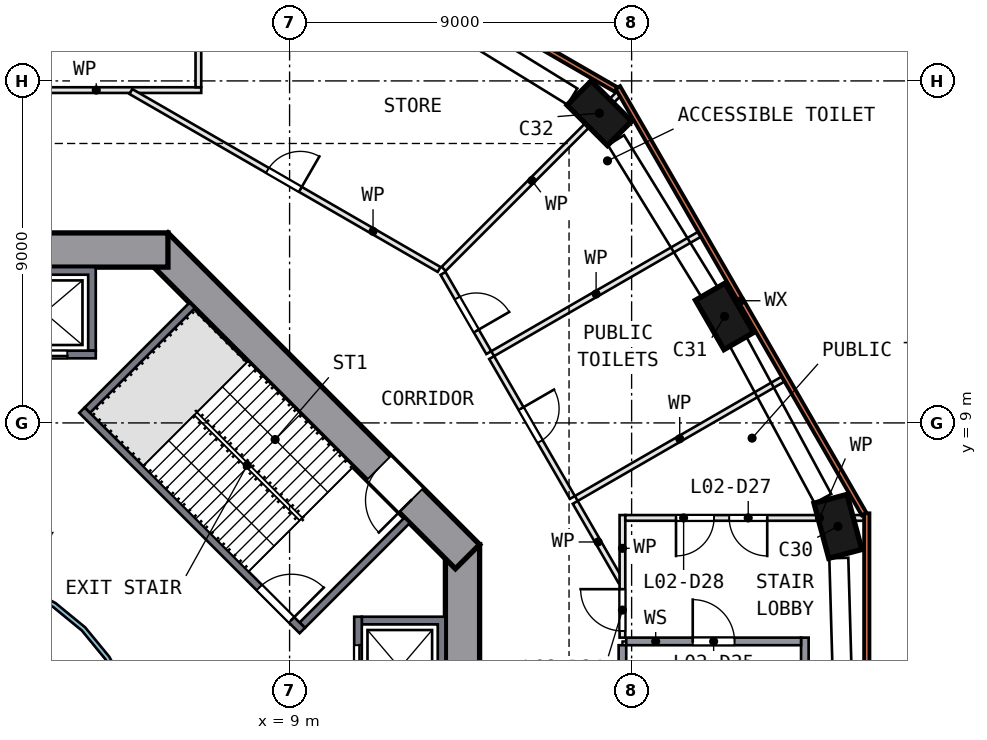
"""IFC4 building model, lengths in metres.
Left out: names, types, materials, properties, quantities, classifications, styles, units other than length and angle.
Written with IfcOpenShell. Run it as: python <this file> out.ifc"""

import sys

from ifc_helpers import new_model, si_unit, direction, frame, frame_2d, origin, origin_2d, place, context, subcontext, project, spatial, polyline, rectangle, outline, extrude, element, fill, save


model = new_model("IFC4")
c1 = context("Model", 3, precision=1e-05, world=origin(), true_north=direction((0.0, 1.0)))
c2 = subcontext(c1, "Body", "Model", "MODEL_VIEW")
j1 = project(units=[si_unit("LENGTHUNIT", "METRE"), si_unit("PLANEANGLEUNIT", "RADIAN")], contexts=[c1])
p1 = place(None, origin())
s1 = spatial("IfcSite", under=j1, at=p1, CompositionType="ELEMENT")
p2 = place(p1, origin())
s2 = spatial("IfcBuilding", under=s1, at=p2, CompositionType="ELEMENT")
p3 = place(p2, frame((0.0, 0.0, 14.0)))
s3 = spatial("IfcBuildingStorey", under=s2, at=p3, CompositionType="ELEMENT", Elevation=14.0)
for number, where, z_axis, x_axis in (
    (1, (23.428, 6.278, 0.0), (0.0, 0.0, 1.0), (0.259, -0.966, 0.0)),
    (2, (20.445, 11.804, 0.0), (0.0, 0.0, 1.0), (-0.5, 0.866, 0.0)),
    (3, (17.151, 17.151, 0.0), (0.0, 0.0, 1.0), (0.707, -0.707, 0.0)),
):
    element("IfcColumn", number, at=place(p3, frame(where, z_axis=z_axis, x_axis=x_axis)), inside=s3, PredefinedType="COLUMN", context=c2, shape_type="SweptSolid", body=[
        extrude(rectangle(XDim=1.5, YDim=0.9, at=origin_2d()), origin(), (0.0, 0.0, 1.0), 4.55),
    ])
p4 = place(p3, frame((13.55, -5.799, 0.0), z_axis=(0.0, 0.0, 1.0), x_axis=(0.0, 1.0, 0.0)))
e4 = element("IfcWall", 4, at=p4, inside=s3, PredefinedType="SHEAR", context=c2, shape_type="SweptSolid", body=[
    extrude(rectangle(XDim=11.598, YDim=0.9, at=frame_2d((5.799, 0.0))), origin(), (0.0, 0.0, 1.0), 5.0),
])
p5 = place(p4, frame((4.899, 0.0, 0.0)))
e5 = element("IfcOpeningElement", 5, at=p5, cuts=e4, PredefinedType="OPENING", context=c2, shape_type="SweptSolid", body=[
    extrude(rectangle(XDim=1.8, YDim=2.1, at=frame_2d((0.9, 1.05))), frame((0.0, 0.46, 0.0), z_axis=(0.0, -1.0, 0.0), x_axis=(1.0, 0.0, 0.0)), (0.0, 0.0, 1.0), 0.92),
])
p6 = place(p3, frame((13.682, 5.481, 0.0), z_axis=(0.0, 0.0, 1.0), x_axis=(-0.707106781, 0.707106781, 0.0)))
e6 = element("IfcWall", 6, at=p6, inside=s3, PredefinedType="SHEAR", context=c2, shape_type="SweptSolid", body=[
    extrude(rectangle(XDim=11.598, YDim=0.9, at=frame_2d((5.799, 0.0))), origin(), (0.0, 0.0, 1.0), 5.0),
])
p7 = place(p6, frame((2.099, 0.0, 0.0)))
e7 = element("IfcOpeningElement", 7, at=p7, cuts=e6, PredefinedType="OPENING", context=c2, shape_type="SweptSolid", body=[
    extrude(rectangle(XDim=1.2, YDim=2.1, at=frame_2d((0.6, 1.05))), frame((0.0, 0.46, 0.0), z_axis=(0.0, -1.0, 0.0), x_axis=(1.0, 0.0, 0.0)), (0.0, 0.0, 1.0), 0.92),
])
p8 = place(p3, frame((5.799, 13.55, 0.0), z_axis=(0.0, 0.0, 1.0), x_axis=(-1.0, 0.0, 0.0)))
e8 = element("IfcWall", 8, at=p8, inside=s3, PredefinedType="SHEAR", context=c2, shape_type="SweptSolid", body=[
    extrude(rectangle(XDim=11.598, YDim=0.9, at=frame_2d((5.799, 0.0))), origin(), (0.0, 0.0, 1.0), 5.0),
])
p9 = place(p8, frame((4.899, 0.0, 0.0)))
e9 = element("IfcOpeningElement", 9, at=p9, cuts=e8, PredefinedType="OPENING", context=c2, shape_type="SweptSolid", body=[
    extrude(rectangle(XDim=1.8, YDim=2.1, at=frame_2d((0.9, 1.05))), frame((0.0, 0.46, 0.0), z_axis=(0.0, -1.0, 0.0), x_axis=(1.0, 0.0, 0.0)), (0.0, 0.0, 1.0), 0.92),
])
p10 = place(p3, frame((24.188, -6.621, 0.0), z_axis=(0.0, 0.0, 1.0), x_axis=(0.0, 1.0, 0.0)))
e10 = element("IfcWall", 10, at=p10, inside=s3, PredefinedType="SOLIDWALL", context=c2, shape_type="SweptSolid", body=[
    extrude(rectangle(XDim=13.242, YDim=0.14, at=frame_2d((6.621, 0.0))), origin(), (0.0, 0.0, 1.0), 4.55),
])
p11 = place(p3, frame((24.118, 6.603, 0.0), z_axis=(0.0, 0.0, 1.0), x_axis=(-0.499997984, 0.866026568, 0.0)))
e11 = element("IfcWall", 11, at=p11, inside=s3, PredefinedType="SOLIDWALL", context=c2, shape_type="SweptSolid", body=[
    extrude(rectangle(XDim=12.962, YDim=0.14, at=frame_2d((6.481, 0.0))), origin(), (0.0, 0.0, 1.0), 4.55),
])
p12 = place(p3, frame((17.586, 17.777, 0.0), z_axis=(0.0, 0.0, 1.0), x_axis=(-0.866023287, 0.500003667, 0.0)))
e12 = element("IfcWall", 12, at=p12, inside=s3, PredefinedType="SOLIDWALL", context=c2, shape_type="SweptSolid", body=[
    extrude(rectangle(XDim=12.801, YDim=0.14, at=frame_2d((6.4, 0.0))), origin(), (0.0, 0.0, 1.0), 4.55),
])
p13 = place(p3, origin())
e13 = element("IfcWall", 13, at=p13, inside=s3, PredefinedType="SOLIDWALL", context=c2, shape_type="SweptSolid", body=[
    extrude(outline(polyline([(13.1, 3.9), (13.1, 1.2), (10.9, 1.2), (10.9, 1.4), (12.9, 1.4), (12.9, 3.7), (10.9, 3.7), (10.9, 3.9), (13.1, 3.9)])), origin(), (0.0, 0.0, 1.0), 4.55),
])
p14 = place(p3, frame((10.8, 1.2, 0.0), z_axis=(0.0, 0.0, 1.0), x_axis=(0.0, 1.0, 0.0)))
e14 = element("IfcWall", 14, at=p14, inside=s3, PredefinedType="SOLIDWALL", context=c2, shape_type="SweptSolid", body=[
    extrude(rectangle(XDim=2.7, YDim=0.2, at=frame_2d((1.35, 0.0))), origin(), (0.0, 0.0, 1.0), 4.55),
])
p15 = place(p14, frame((0.75, 0.0, 0.0)))
e15 = element("IfcOpeningElement", 15, at=p15, cuts=e14, PredefinedType="OPENING", context=c2, shape_type="SweptSolid", body=[
    extrude(rectangle(XDim=1.2, YDim=2.1, at=frame_2d((0.6, 1.05))), frame((0.0, 0.11, 0.0), z_axis=(0.0, -1.0, 0.0), x_axis=(1.0, 0.0, 0.0)), (0.0, 0.0, 1.0), 0.22),
])
p16 = place(p3, origin())
e16 = element("IfcWall", 16, at=p16, inside=s3, PredefinedType="SOLIDWALL", context=c2, shape_type="SweptSolid", body=[
    extrude(outline(polyline([(3.9, 13.1), (3.9, 10.9), (3.7, 10.9), (3.7, 12.9), (1.4, 12.9), (1.4, 10.9), (1.2, 10.9), (1.2, 13.1), (3.9, 13.1)])), origin(), (0.0, 0.0, 1.0), 4.55),
])
p17 = place(p3, frame((1.2, 10.8, 0.0), z_axis=(0.0, 0.0, 1.0), x_axis=(1.0, 0.0, 0.0)))
e17 = element("IfcWall", 17, at=p17, inside=s3, PredefinedType="SOLIDWALL", context=c2, shape_type="SweptSolid", body=[
    extrude(rectangle(XDim=2.7, YDim=0.2, at=frame_2d((1.35, 0.0))), origin(), (0.0, 0.0, 1.0), 4.55),
])
p18 = place(p17, frame((0.75, 0.0, 0.0)))
e18 = element("IfcOpeningElement", 18, at=p18, cuts=e17, PredefinedType="OPENING", context=c2, shape_type="SweptSolid", body=[
    extrude(rectangle(XDim=1.2, YDim=2.1, at=frame_2d((0.6, 1.05))), frame((0.0, 0.11, 0.0), z_axis=(0.0, -1.0, 0.0), x_axis=(1.0, 0.0, 0.0)), (0.0, 0.0, 1.0), 0.22),
])
p19 = place(p3, frame((3.535, 9.334, 0.0), z_axis=(0.0, 0.0, 1.0), x_axis=(0.707106781, -0.707106781, 0.0)))
e19 = element("IfcWall", 19, at=p19, inside=s3, PredefinedType="SOLIDWALL", context=c2, shape_type="SweptSolid", body=[
    extrude(rectangle(XDim=8.2, YDim=0.2, at=frame_2d((4.1, 0.0))), origin(), (0.0, 0.0, 1.0), 4.55),
])
p20 = place(p19, frame((6.6, 0.0, 0.0)))
e20 = element("IfcOpeningElement", 20, at=p20, cuts=e19, PredefinedType="OPENING", context=c2, shape_type="SweptSolid", body=[
    extrude(rectangle(XDim=1.2, YDim=2.1, at=frame_2d((0.6, 1.05))), frame((0.0, 0.11, 0.0), z_axis=(0.0, -1.0, 0.0), x_axis=(1.0, 0.0, 0.0)), (0.0, 0.0, 1.0), 0.22),
])
for number, where, z_axis, x_axis in (
    (21, (9.334, 3.677, 0.0), (0.0, 0.0, 1.0), (0.707, 0.707, 0.0)),
    (22, (3.677, 9.334, 0.0), (0.0, 0.0, 1.0), (0.707, 0.707, 0.0)),
):
    element("IfcWall", number, at=place(p3, frame(where, z_axis=z_axis, x_axis=x_axis)), inside=s3, PredefinedType="SOLIDWALL", context=c2, shape_type="SweptSolid", body=[
        extrude(rectangle(XDim=3.9, YDim=0.2, at=frame_2d((1.95, 0.0))), origin(), (0.0, 0.0, 1.0), 4.55),
    ])
p21 = place(p3, origin())
e23 = element("IfcWall", 23, at=p21, inside=s3, PredefinedType="SOLIDWALL", context=c2, shape_type="SweptSolid", body=[
    extrude(outline(polyline([(5.021, -0.999), (4.73, -1.959), (4.257, -2.844), (3.62, -3.62), (2.844, -4.257), (1.959, -4.73), (0.999, -5.021), (0.0, -5.12), (-0.999, -5.021), (-1.959, -4.73), (-2.844, -4.257), (-3.62, -3.62), (-4.257, -2.844), (-4.73, -1.959), (-5.021, -0.999), (-5.12, 0.0), (-5.021, 0.999), (-4.73, 1.959), (-4.257, 2.844), (-3.62, 3.62), (-2.844, 4.257), (-1.959, 4.73), (-0.999, 5.021), (0.0, 5.12), (0.999, 5.021), (1.959, 4.73), (2.844, 4.257), (3.62, 3.62), (4.257, 2.844), (4.73, 1.959), (5.021, 0.999), (5.12, 0.0), (5.021, -0.999)]), holes=[polyline([(4.904, 0.976), (4.619, 1.913), (4.157, 2.778), (3.535, 3.535), (2.778, 4.157), (1.913, 4.619), (0.976, 4.904), (0.0, 5.0), (-0.976, 4.904), (-1.913, 4.619), (-2.778, 4.157), (-3.535, 3.535), (-4.157, 2.778), (-4.619, 1.913), (-4.904, 0.976), (-5.0, 0.0), (-4.904, -0.976), (-4.619, -1.913), (-4.157, -2.778), (-3.535, -3.535), (-2.778, -4.157), (-1.913, -4.619), (-0.976, -4.904), (0.0, -5.0), (0.976, -4.904), (1.913, -4.619), (2.778, -4.157), (3.535, -3.535), (4.157, -2.778), (4.619, -1.913), (4.904, -0.976), (5.0, 0.0), (4.904, 0.976)])]), origin(), (0.0, 0.0, 1.0), 4.55),
])
p22 = place(p3, frame((1.15, 17.758, 0.0), z_axis=(0.0, 0.0, 1.0), x_axis=(1.0, 0.0, 0.0)))
e24 = element("IfcWall", 24, at=p22, inside=s3, PredefinedType="PARTITIONING", context=c2, shape_type="SweptSolid", body=[
    extrude(rectangle(XDim=5.525, YDim=0.15, at=frame_2d((2.763, 0.0))), origin(), (0.0, 0.0, 1.0), 4.55),
])
p23 = place(p3, frame((4.823, 17.721, 0.0), z_axis=(0.0, 0.0, 1.0), x_axis=(0.866037142, -0.499979668, 0.0)))
e25 = element("IfcWall", 25, at=p23, inside=s3, PredefinedType="PARTITIONING", context=c2, shape_type="SweptSolid", body=[
    extrude(rectangle(XDim=9.367, YDim=0.15, at=frame_2d((4.683, 0.0))), origin(), (0.0, 0.0, 1.0), 4.55),
])
p24 = place(p23, frame((4.15, 0.0, 0.0)))
e26 = element("IfcOpeningElement", 26, at=p24, cuts=e25, PredefinedType="OPENING", context=c2, shape_type="SweptSolid", body=[
    extrude(rectangle(XDim=1.0, YDim=2.1, at=frame_2d((0.5, 1.05))), frame((0.0, 0.085, 0.0), z_axis=(0.0, -1.0, 0.0), x_axis=(1.0, 0.0, 0.0)), (0.0, 0.0, 1.0), 0.17),
])
p25 = place(p3, frame((6.6, 17.833, 0.0), z_axis=(0.0, 0.0, 1.0), x_axis=(0.0, 1.0, 0.0)))
e27 = element("IfcWall", 27, at=p25, inside=s3, PredefinedType="PARTITIONING", context=c2, shape_type="SweptSolid", body=[
    extrude(rectangle(XDim=5.582, YDim=0.15, at=frame_2d((2.791, 0.0))), origin(), (0.0, 0.0, 1.0), 4.55),
])
p26 = place(p3, frame((13.038, 12.935, 0.0), z_axis=(0.0, 0.0, 1.0), x_axis=(0.499933044, -0.866064057, 0.0)))
e28 = element("IfcWall", 28, at=p26, inside=s3, PredefinedType="PARTITIONING", context=c2, shape_type="SweptSolid", body=[
    extrude(rectangle(XDim=2.408, YDim=0.15, at=frame_2d((1.204, 0.0))), origin(), (0.0, 0.0, 1.0), 4.55),
])
p27 = place(p26, frame((0.75, 0.0, 0.0)))
e29 = element("IfcOpeningElement", 29, at=p27, cuts=e28, PredefinedType="OPENING", context=c2, shape_type="SweptSolid", body=[
    extrude(rectangle(XDim=1.0, YDim=2.1, at=frame_2d((0.5, 1.05))), frame((0.0, 0.085, 0.0), z_axis=(0.0, -1.0, 0.0), x_axis=(1.0, 0.0, 0.0)), (0.0, 0.0, 1.0), 0.17),
])
p28 = place(p3, frame((14.317, 10.719, 0.0), z_axis=(0.0, 0.0, 1.0), x_axis=(0.500037366, -0.866003829, 0.0)))
e30 = element("IfcWall", 30, at=p28, inside=s3, PredefinedType="PARTITIONING", context=c2, shape_type="SweptSolid", body=[
    extrude(rectangle(XDim=4.25, YDim=0.15, at=frame_2d((2.125, 0.0))), origin(), (0.0, 0.0, 1.0), 4.55),
])
p29 = place(p28, frame((1.55, 0.0, 0.0)))
e31 = element("IfcOpeningElement", 31, at=p29, cuts=e30, PredefinedType="OPENING", context=c2, shape_type="SweptSolid", body=[
    extrude(rectangle(XDim=1.0, YDim=2.1, at=frame_2d((0.5, 1.05))), frame((0.0, 0.085, 0.0), z_axis=(0.0, -1.0, 0.0), x_axis=(1.0, 0.0, 0.0)), (0.0, 0.0, 1.0), 0.17),
])
p30 = place(p3, frame((16.517, 6.909, 0.0), z_axis=(0.0, 0.0, 1.0), x_axis=(0.499933044, -0.866064057, 0.0)))
e32 = element("IfcWall", 32, at=p30, inside=s3, PredefinedType="PARTITIONING", context=c2, shape_type="SweptSolid", body=[
    extrude(rectangle(XDim=2.408, YDim=0.15, at=frame_2d((1.204, 0.0))), origin(), (0.0, 0.0, 1.0), 4.55),
])
p31 = place(p3, frame((17.758, 3.15, 0.0), z_axis=(0.0, 0.0, 1.0), x_axis=(0.0, -1.0, 0.0)))
e33 = element("IfcWall", 33, at=p31, inside=s3, PredefinedType="SOLIDWALL", context=c2, shape_type="SweptSolid", body=[
    extrude(rectangle(XDim=9.3, YDim=0.2, at=frame_2d((4.65, 0.0))), origin(), (0.0, 0.0, 1.0), 4.55),
])
p32 = place(p3, frame((17.758, 3.35, 0.0), z_axis=(0.0, 0.0, 1.0), x_axis=(0.0, 1.0, 0.0)))
e34 = element("IfcWall", 34, at=p32, inside=s3, PredefinedType="PARTITIONING", context=c2, shape_type="SweptSolid", body=[
    extrude(rectangle(XDim=3.225, YDim=0.15, at=frame_2d((1.613, 0.0))), origin(), (0.0, 0.0, 1.0), 4.55),
])
p33 = place(p32, frame((0.175, 0.0, 0.0)))
e35 = element("IfcOpeningElement", 35, at=p33, cuts=e34, PredefinedType="OPENING", context=c2, shape_type="SweptSolid", body=[
    extrude(rectangle(XDim=1.1, YDim=2.1, at=frame_2d((0.55, 1.05))), frame((0.0, 0.085, 0.0), z_axis=(0.0, -1.0, 0.0), x_axis=(1.0, 0.0, 0.0)), (0.0, 0.0, 1.0), 0.17),
])
p34 = place(p3, frame((17.7, 17.7, 0.0), z_axis=(0.0, 0.0, 1.0), x_axis=(-0.707106781, -0.707106781, 0.0)))
e36 = element("IfcWall", 36, at=p34, inside=s3, PredefinedType="PARTITIONING", context=c2, shape_type="SweptSolid", body=[
    extrude(rectangle(XDim=6.572, YDim=0.15, at=frame_2d((3.286, 0.0))), origin(), (0.0, 0.0, 1.0), 4.55),
])
p35 = place(p3, frame((19.787, 13.964, 0.0), z_axis=(0.0, 0.0, 1.0), x_axis=(-0.866042631, -0.49997016, 0.0)))
e37 = element("IfcWall", 37, at=p35, inside=s3, PredefinedType="PARTITIONING", context=c2, shape_type="SweptSolid", body=[
    extrude(rectangle(XDim=6.285, YDim=0.15, at=frame_2d((3.143, 0.0))), origin(), (0.0, 0.0, 1.0), 4.55),
])
p36 = place(p3, frame((21.987, 10.154, 0.0), z_axis=(0.0, 0.0, 1.0), x_axis=(-0.866032921, -0.49998698, 0.0)))
e38 = element("IfcWall", 38, at=p36, inside=s3, PredefinedType="PARTITIONING", context=c2, shape_type="SweptSolid", body=[
    extrude(rectangle(XDim=6.285, YDim=0.15, at=frame_2d((3.143, 0.0))), origin(), (0.0, 0.0, 1.0), 4.55),
])
p37 = place(p3, frame((22.558, -6.15, 0.0), z_axis=(0.0, 0.0, 1.0), x_axis=(0.0, 1.0, 0.0)))
e39 = element("IfcWall", 39, at=p37, inside=s3, PredefinedType="SOLIDWALL", context=c2, shape_type="SweptSolid", body=[
    extrude(rectangle(XDim=9.5, YDim=0.2, at=frame_2d((4.75, 0.0))), origin(), (0.0, 0.0, 1.0), 4.55),
])
p38 = place(p3, frame((17.858, 3.25, 0.0), z_axis=(0.0, 0.0, 1.0), x_axis=(1.0, 0.0, 0.0)))
e40 = element("IfcWall", 40, at=p38, inside=s3, PredefinedType="SOLIDWALL", context=c2, shape_type="SweptSolid", body=[
    extrude(rectangle(XDim=4.6, YDim=0.2, at=frame_2d((2.3, 0.0))), origin(), (0.0, 0.0, 1.0), 4.55),
])
p39 = place(p38, frame((1.75, 0.0, 0.0)))
e41 = element("IfcOpeningElement", 41, at=p39, cuts=e40, PredefinedType="OPENING", context=c2, shape_type="SweptSolid", body=[
    extrude(rectangle(XDim=1.1, YDim=2.1, at=frame_2d((0.55, 1.05))), frame((0.0, 0.11, 0.0), z_axis=(0.0, -1.0, 0.0), x_axis=(1.0, 0.0, 0.0)), (0.0, 0.0, 1.0), 0.22),
])
p40 = place(p3, frame((24.118, 6.5, 0.0), z_axis=(0.0, 0.0, 1.0), x_axis=(-1.0, 0.0, 0.0)))
e42 = element("IfcWall", 42, at=p40, inside=s3, PredefinedType="PARTITIONING", context=c2, shape_type="SweptSolid", body=[
    extrude(rectangle(XDim=6.285, YDim=0.15, at=frame_2d((3.143, 0.0))), origin(), (0.0, 0.0, 1.0), 4.55),
])
p41 = place(p40, frame((2.55, 0.0, 0.0)))
e43 = element("IfcOpeningElement", 43, at=p41, cuts=e42, PredefinedType="OPENING", context=c2, shape_type="SweptSolid", body=[
    extrude(rectangle(XDim=1.0, YDim=2.1, at=frame_2d((0.5, 1.05))), frame((0.0, 0.085, 0.0), z_axis=(0.0, -1.0, 0.0), x_axis=(1.0, 0.0, 0.0)), (0.0, 0.0, 1.0), 0.17),
])
p42 = place(p40, frame((3.95, 0.0, 0.0)))
e44 = element("IfcOpeningElement", 44, at=p42, cuts=e42, PredefinedType="OPENING", context=c2, shape_type="SweptSolid", body=[
    extrude(rectangle(XDim=1.0, YDim=2.1, at=frame_2d((0.5, 1.05))), frame((0.0, 0.085, 0.0), z_axis=(0.0, -1.0, 0.0), x_axis=(1.0, 0.0, 0.0)), (0.0, 0.0, 1.0), 0.17),
])
p43 = place(p15, origin())
e45 = element("IfcDoor", 45, at=p43, inside=s3, OperationType="DOUBLE_DOOR_SLIDING", PredefinedType="DOOR", context=c2, shape_type="SweptSolid", body=[
    extrude(rectangle(XDim=1.2, YDim=2.1, at=frame_2d((0.6, 1.05))), frame((0.0, 0.025, 0.0), z_axis=(0.0, -1.0, 0.0), x_axis=(1.0, 0.0, 0.0)), (0.0, 0.0, 1.0), 0.05),
])
fill(e15, e45)
p44 = place(p18, origin())
e46 = element("IfcDoor", 46, at=p44, inside=s3, OperationType="DOUBLE_DOOR_SLIDING", PredefinedType="DOOR", context=c2, shape_type="SweptSolid", body=[
    extrude(rectangle(XDim=1.2, YDim=2.1, at=frame_2d((0.6, 1.05))), frame((0.0, 0.025, 0.0), z_axis=(0.0, -1.0, 0.0), x_axis=(1.0, 0.0, 0.0)), (0.0, 0.0, 1.0), 0.05),
])
fill(e18, e46)
p45 = place(p20, origin())
e47 = element("IfcDoor", 47, at=p45, inside=s3, OperationType="SINGLE_SWING_RIGHT", PredefinedType="DOOR", context=c2, shape_type="SweptSolid", body=[
    extrude(rectangle(XDim=1.2, YDim=2.1, at=frame_2d((0.6, 1.05))), frame((0.0, 0.025, 0.0), z_axis=(0.0, -1.0, 0.0), x_axis=(1.0, 0.0, 0.0)), (0.0, 0.0, 1.0), 0.05),
])
fill(e20, e47)
p46 = place(p7, origin())
e48 = element("IfcDoor", 48, at=p46, inside=s3, OperationType="SINGLE_SWING_LEFT", PredefinedType="DOOR", context=c2, shape_type="SweptSolid", body=[
    extrude(rectangle(XDim=1.2, YDim=2.1, at=frame_2d((0.6, 1.05))), frame((0.0, 0.025, 0.0), z_axis=(0.0, -1.0, 0.0), x_axis=(1.0, 0.0, 0.0)), (0.0, 0.0, 1.0), 0.05),
])
fill(e7, e48)
p47 = place(p24, origin())
e49 = element("IfcDoor", 49, at=p47, inside=s3, OperationType="SINGLE_SWING_RIGHT", PredefinedType="DOOR", context=c2, shape_type="SweptSolid", body=[
    extrude(rectangle(XDim=1.0, YDim=2.1, at=frame_2d((0.5, 1.05))), frame((0.0, 0.025, 0.0), z_axis=(0.0, -1.0, 0.0), x_axis=(1.0, 0.0, 0.0)), (0.0, 0.0, 1.0), 0.05),
])
fill(e26, e49)
p48 = place(p27, origin())
e50 = element("IfcDoor", 50, at=p48, inside=s3, OperationType="SINGLE_SWING_RIGHT", PredefinedType="DOOR", context=c2, shape_type="SweptSolid", body=[
    extrude(rectangle(XDim=1.0, YDim=2.1, at=frame_2d((0.5, 1.05))), frame((0.0, 0.025, 0.0), z_axis=(0.0, -1.0, 0.0), x_axis=(1.0, 0.0, 0.0)), (0.0, 0.0, 1.0), 0.05),
])
fill(e29, e50)
p49 = place(p29, origin())
e51 = element("IfcDoor", 51, at=p49, inside=s3, OperationType="SINGLE_SWING_LEFT", PredefinedType="DOOR", context=c2, shape_type="SweptSolid", body=[
    extrude(rectangle(XDim=1.0, YDim=2.1, at=frame_2d((0.5, 1.05))), frame((0.0, 0.025, 0.0), z_axis=(0.0, -1.0, 0.0), x_axis=(1.0, 0.0, 0.0)), (0.0, 0.0, 1.0), 0.05),
])
fill(e31, e51)
p50 = place(p33, origin())
e52 = element("IfcDoor", 52, at=p50, inside=s3, OperationType="SINGLE_SWING_RIGHT", PredefinedType="DOOR", context=c2, shape_type="SweptSolid", body=[
    extrude(rectangle(XDim=1.1, YDim=2.1, at=frame_2d((0.55, 1.05))), frame((0.0, 0.025, 0.0), z_axis=(0.0, -1.0, 0.0), x_axis=(1.0, 0.0, 0.0)), (0.0, 0.0, 1.0), 0.05),
])
fill(e35, e52)
p51 = place(p39, origin())
e53 = element("IfcDoor", 53, at=p51, inside=s3, OperationType="SINGLE_SWING_LEFT", PredefinedType="DOOR", context=c2, shape_type="SweptSolid", body=[
    extrude(rectangle(XDim=1.1, YDim=2.1, at=frame_2d((0.55, 1.05))), frame((0.0, 0.025, 0.0), z_axis=(0.0, -1.0, 0.0), x_axis=(1.0, 0.0, 0.0)), (0.0, 0.0, 1.0), 0.05),
])
fill(e41, e53)
p52 = place(p41, origin())
e54 = element("IfcDoor", 54, at=p52, inside=s3, OperationType="SINGLE_SWING_LEFT", PredefinedType="DOOR", context=c2, shape_type="SweptSolid", body=[
    extrude(rectangle(XDim=1.0, YDim=2.1, at=frame_2d((0.5, 1.05))), frame((0.0, 0.025, 0.0), z_axis=(0.0, -1.0, 0.0), x_axis=(1.0, 0.0, 0.0)), (0.0, 0.0, 1.0), 0.05),
])
fill(e43, e54)
p53 = place(p42, origin())
e55 = element("IfcDoor", 55, at=p53, inside=s3, OperationType="SINGLE_SWING_RIGHT", PredefinedType="DOOR", context=c2, shape_type="SweptSolid", body=[
    extrude(rectangle(XDim=1.0, YDim=2.1, at=frame_2d((0.5, 1.05))), frame((0.0, 0.025, 0.0), z_axis=(0.0, -1.0, 0.0), x_axis=(1.0, 0.0, 0.0)), (0.0, 0.0, 1.0), 0.05),
])
fill(e44, e55)
save(model, sys.argv[1])
